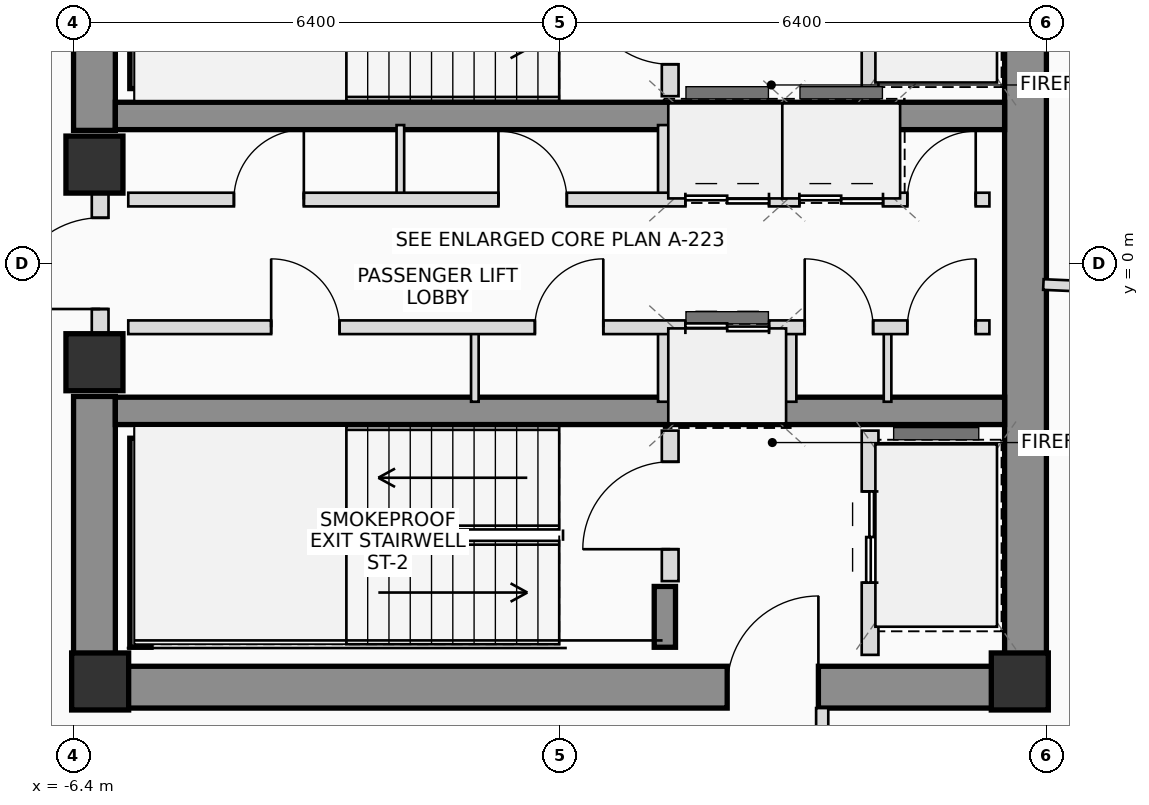
"""IFC4 building model, lengths in metres.
Left out: names, types, materials, properties, quantities, classifications, styles, units other than length and angle.
Written with IfcOpenShell. Run it as: python <this file> out.ifc"""

import sys

from ifc_helpers import new_model, si_unit, direction, frame, frame_2d, origin, origin_2d, place, context, subcontext, project, spatial, rectangle, extrude, source, transform, mapped, element, fill, save


model = new_model("IFC4")
c1 = context("Model", 3, precision=1e-05, world=origin(), true_north=direction((0.0, 1.0)))
c2 = subcontext(c1, "Body", "Model", "MODEL_VIEW")
j1 = project(units=[si_unit("LENGTHUNIT", "METRE"), si_unit("PLANEANGLEUNIT", "RADIAN")], contexts=[c1])
p1 = place(None, origin())
s1 = spatial("IfcSite", under=j1, at=p1, CompositionType="ELEMENT")
p2 = place(p1, origin())
s2 = spatial("IfcBuilding", under=s1, at=p2, CompositionType="ELEMENT")
p3 = place(p2, frame((0.0, 0.0, 249.05)))
s3 = spatial("IfcBuildingStorey", under=s2, at=p3, CompositionType="ELEMENT", Elevation=249.05)
m1 = source(origin(), c2, "Body", "SweptSolid", [
    extrude(rectangle(XDim=0.75, YDim=0.75, at=origin_2d()), origin(), (0.0, 0.0, 1.0), 3.4),
])
for number, where, z_axis, x_axis in (
    (1, (-6.05, -5.5, 0.0), (0.0, 0.0, 1.0), (1.0, 0.0, 0.0)),
    (2, (6.05, -5.5, 0.0), (0.0, 0.0, 1.0), (1.0, 0.0, 0.0)),
):
    element("IfcColumn", number, at=place(p3, frame(where, z_axis=z_axis, x_axis=x_axis)), inside=s3, PredefinedType="COLUMN", context=c2, shape_type="MappedRepresentation", body=[
        mapped(m1, transform((0.0, 0.0, 0.0), scale=1.0)),
    ])
p4 = place(p3, frame((-6.4, -5.575, 0.0), z_axis=(0.0, 0.0, 1.0), x_axis=(1.0, 0.0, 0.0)))
e3 = element("IfcWall", 3, at=p4, inside=s3, PredefinedType="SHEAR", context=c2, shape_type="SweptSolid", body=[
    extrude(rectangle(XDim=12.8, YDim=0.55, at=frame_2d((6.4, 0.0))), origin(), (0.0, 0.0, 1.0), 3.4),
])
p5 = place(p4, frame((8.6, 0.0, 0.0)))
e4 = element("IfcOpeningElement", 4, at=p5, cuts=e3, PredefinedType="OPENING", context=c2, shape_type="SweptSolid", body=[
    extrude(rectangle(XDim=1.2, YDim=2.2, at=frame_2d((0.6, 1.1))), frame((0.0, 0.285, 0.0), z_axis=(0.0, -1.0, 0.0), x_axis=(1.0, 0.0, 0.0)), (0.0, 0.0, 1.0), 0.57),
])
p6 = place(p3, frame((6.125, -5.3, 0.0), z_axis=(0.0, 0.0, 1.0), x_axis=(0.0, 1.0, 0.0)))
e5 = element("IfcWall", 5, at=p6, inside=s3, PredefinedType="SHEAR", context=c2, shape_type="SweptSolid", body=[
    extrude(rectangle(XDim=10.6, YDim=0.55, at=frame_2d((5.3, 0.0))), origin(), (0.0, 0.0, 1.0), 3.4),
])
for number, where, z_axis, x_axis in (
    (6, (-6.125, -5.3, 0.0), (0.0, 0.0, 1.0), (0.0, 1.0, 0.0)),
    (7, (-6.125, 1.75, 0.0), (0.0, 0.0, 1.0), (0.0, 1.0, 0.0)),
):
    element("IfcWall", number, at=place(p3, frame(where, z_axis=z_axis, x_axis=x_axis)), inside=s3, PredefinedType="SHEAR", context=c2, shape_type="SweptSolid", body=[
        extrude(rectangle(XDim=3.55, YDim=0.55, at=frame_2d((1.775, 0.0))), origin(), (0.0, 0.0, 1.0), 3.4),
    ])
for number, where, z_axis, x_axis in (
    (8, (-5.85, 1.94, 0.0), (0.0, 0.0, 1.0), (1.0, 0.0, 0.0)),
    (9, (-5.85, -1.94, 0.0), (0.0, 0.0, 1.0), (1.0, 0.0, 0.0)),
):
    element("IfcWall", number, at=place(p3, frame(where, z_axis=z_axis, x_axis=x_axis)), inside=s3, PredefinedType="SHEAR", context=c2, shape_type="SweptSolid", body=[
        extrude(rectangle(XDim=11.7, YDim=0.36, at=frame_2d((5.85, 0.0))), origin(), (0.0, 0.0, 1.0), 3.4),
    ])
for number, where, z_axis, x_axis in (
    (10, (-5.52, 2.3, 0.0), (0.0, 0.0, 1.0), (0.0, 1.0, 0.0)),
    (11, (-5.52, -5.05, 0.0), (0.0, 0.0, 1.0), (0.0, 1.0, 0.0)),
):
    element("IfcWall", number, at=place(p3, frame(where, z_axis=z_axis, x_axis=x_axis)), inside=s3, PredefinedType="SHEAR", context=c2, shape_type="SweptSolid", body=[
        extrude(rectangle(XDim=2.75, YDim=0.28, at=frame_2d((1.375, 0.0))), origin(), (0.0, 0.0, 1.0), 3.4),
    ])
p7 = place(p3, frame((1.38, -5.05, 0.0), z_axis=(0.0, 0.0, 1.0), x_axis=(0.0, 1.0, 0.0)))
e12 = element("IfcWall", 12, at=p7, inside=s3, PredefinedType="SHEAR", context=c2, shape_type="SweptSolid", body=[
    extrude(rectangle(XDim=0.8, YDim=0.28, at=frame_2d((0.4, 0.0))), origin(), (0.0, 0.0, 1.0), 3.4),
])
for number, where, z_axis, x_axis in (
    (13, (-6.125, -1.3, 0.0), (0.0, 0.0, 1.0), (1.0, 0.0, 0.0)),
    (14, (-6.125, 1.3, 0.0), (0.0, 0.0, 1.0), (1.0, 0.0, 0.0)),
):
    element("IfcColumn", number, at=place(p3, frame(where, z_axis=z_axis, x_axis=x_axis)), inside=s3, PredefinedType="COLUMN", context=c2, shape_type="MappedRepresentation", body=[
        mapped(m1, transform((0.0, 0.0, 0.0), scale=1.0)),
    ])
p8 = place(p3, frame((-6.05, -0.95, 0.0), z_axis=(0.0, 0.0, 1.0), x_axis=(0.0, 1.0, 0.0)))
e15 = element("IfcWall", 15, at=p8, inside=s3, PredefinedType="PLUMBINGWALL", context=c2, shape_type="SweptSolid", body=[
    extrude(rectangle(XDim=1.9, YDim=0.22, at=frame_2d((0.95, 0.0))), origin(), (0.0, 0.0, 1.0), 2.14),
])
p9 = place(p8, frame((0.35, 0.0, 0.0)))
e16 = element("IfcOpeningElement", 16, at=p9, cuts=e15, PredefinedType="OPENING", context=c2, shape_type="SweptSolid", body=[
    extrude(rectangle(XDim=1.2, YDim=2.2, at=frame_2d((0.6, 1.1))), frame((0.0, 0.12, 0.0), z_axis=(0.0, -1.0, 0.0), x_axis=(1.0, 0.0, 0.0)), (0.0, 0.0, 1.0), 0.24),
])
p10 = place(p3, frame((1.45, 2.2, 0.0), z_axis=(0.0, 0.0, 1.0), x_axis=(0.0, 1.0, 0.0)))
e17 = element("IfcWall", 17, at=p10, inside=s3, PredefinedType="PLUMBINGWALL", context=c2, shape_type="SweptSolid", body=[
    extrude(rectangle(XDim=1.98, YDim=0.22, at=frame_2d((0.99, 0.0))), origin(), (0.0, 0.0, 1.0), 3.16),
])
p11 = place(p10, frame((0.42, 0.0, 0.0)))
e18 = element("IfcOpeningElement", 18, at=p11, cuts=e17, PredefinedType="OPENING", context=c2, shape_type="SweptSolid", body=[
    extrude(rectangle(XDim=1.15, YDim=2.15, at=frame_2d((0.575, 1.075))), frame((0.0, 0.12, 0.0), z_axis=(0.0, -1.0, 0.0), x_axis=(1.0, 0.0, 0.0)), (0.0, 0.0, 1.0), 0.24),
])
p12 = place(p3, frame((4.08, 2.2, 0.0), z_axis=(0.0, 0.0, 1.0), x_axis=(0.0, 1.0, 0.0)))
e19 = element("IfcWall", 19, at=p12, inside=s3, PredefinedType="PLUMBINGWALL", context=c2, shape_type="SweptSolid", body=[
    extrude(rectangle(XDim=2.95, YDim=0.22, at=frame_2d((1.475, 0.0))), origin(), (0.0, 0.0, 1.0), 3.16),
])
p13 = place(p12, frame((0.75, 0.0, 0.0)))
e20 = element("IfcOpeningElement", 20, at=p13, cuts=e19, PredefinedType="OPENING", context=c2, shape_type="SweptSolid", body=[
    extrude(rectangle(XDim=1.2, YDim=2.25, at=frame_2d((0.6, 1.125))), frame((0.0, 0.12, 0.0), z_axis=(0.0, -1.0, 0.0), x_axis=(1.0, 0.0, 0.0)), (0.0, 0.0, 1.0), 0.24),
])
p14 = place(p3, frame((1.45, -4.18, 0.0), z_axis=(0.0, 0.0, 1.0), x_axis=(0.0, 1.0, 0.0)))
e21 = element("IfcWall", 21, at=p14, inside=s3, PredefinedType="PLUMBINGWALL", context=c2, shape_type="SweptSolid", body=[
    extrude(rectangle(XDim=1.98, YDim=0.22, at=frame_2d((0.99, 0.0))), origin(), (0.0, 0.0, 1.0), 3.16),
])
p15 = place(p14, frame((0.42, 0.0, 0.0)))
e22 = element("IfcOpeningElement", 22, at=p15, cuts=e21, PredefinedType="OPENING", context=c2, shape_type="SweptSolid", body=[
    extrude(rectangle(XDim=1.15, YDim=2.15, at=frame_2d((0.575, 1.075))), frame((0.0, 0.12, 0.0), z_axis=(0.0, -1.0, 0.0), x_axis=(1.0, 0.0, 0.0)), (0.0, 0.0, 1.0), 0.24),
])
p16 = place(p3, frame((4.08, -5.15, 0.0), z_axis=(0.0, 0.0, 1.0), x_axis=(0.0, 1.0, 0.0)))
e23 = element("IfcWall", 23, at=p16, inside=s3, PredefinedType="PLUMBINGWALL", context=c2, shape_type="SweptSolid", body=[
    extrude(rectangle(XDim=2.95, YDim=0.22, at=frame_2d((1.475, 0.0))), origin(), (0.0, 0.0, 1.0), 3.16),
])
p17 = place(p16, frame((0.95, 0.0, 0.0)))
e24 = element("IfcOpeningElement", 24, at=p17, cuts=e23, PredefinedType="OPENING", context=c2, shape_type="SweptSolid", body=[
    extrude(rectangle(XDim=1.2, YDim=2.25, at=frame_2d((0.6, 1.125))), frame((0.0, 0.12, 0.0), z_axis=(0.0, -1.0, 0.0), x_axis=(1.0, 0.0, 0.0)), (0.0, 0.0, 1.0), 0.24),
])
for number, where, z_axis, x_axis in (
    (25, (-2.1, 0.84, 0.0), (0.0, 0.0, 1.0), (0.0, 1.0, 0.0)),
    (26, (-1.12, -1.82, 0.0), (0.0, 0.0, 1.0), (0.0, 1.0, 0.0)),
):
    element("IfcWall", number, at=place(p3, frame(where, z_axis=z_axis, x_axis=x_axis)), inside=s3, PredefinedType="PARTITIONING", context=c2, shape_type="SweptSolid", body=[
        extrude(rectangle(XDim=0.98, YDim=0.1, at=frame_2d((0.49, 0.0))), origin(), (0.0, 0.0, 1.0), 3.16),
    ])
for number, where, z_axis, x_axis in (
    (27, (1.38, 0.84, 0.0), (0.0, 0.0, 1.0), (0.0, 1.0, 0.0)),
    (28, (1.38, -1.82, 0.0), (0.0, 0.0, 1.0), (0.0, 1.0, 0.0)),
    (29, (3.02, 0.84, 0.0), (0.0, 0.0, 1.0), (0.0, 1.0, 0.0)),
    (30, (4.38, 0.84, 0.0), (0.0, 0.0, 1.0), (0.0, 1.0, 0.0)),
    (31, (3.02, -1.82, 0.0), (0.0, 0.0, 1.0), (0.0, 1.0, 0.0)),
):
    element("IfcWall", number, at=place(p3, frame(where, z_axis=z_axis, x_axis=x_axis)), inside=s3, PredefinedType="PLUMBINGWALL", context=c2, shape_type="SweptSolid", body=[
        extrude(rectangle(XDim=0.98, YDim=0.18, at=frame_2d((0.49, 0.0))), origin(), (0.0, 0.0, 1.0), 3.16),
    ])
p18 = place(p3, frame((4.31, -1.82, 0.0), z_axis=(0.0, 0.0, 1.0), x_axis=(0.0, 1.0, 0.0)))
e32 = element("IfcWall", 32, at=p18, inside=s3, PredefinedType="PARTITIONING", context=c2, shape_type="SweptSolid", body=[
    extrude(rectangle(XDim=0.98, YDim=0.1, at=frame_2d((0.49, 0.0))), origin(), (0.0, 0.0, 1.0), 3.16),
])
p19 = place(p3, frame((-5.68, 0.84, 0.0), z_axis=(0.0, 0.0, 1.0), x_axis=(1.0, 0.0, 0.0)))
e33 = element("IfcWall", 33, at=p19, inside=s3, PredefinedType="PLUMBINGWALL", context=c2, shape_type="SweptSolid", body=[
    extrude(rectangle(XDim=11.33, YDim=0.18, at=frame_2d((5.665, 0.0))), origin(), (0.0, 0.0, 1.0), 3.16),
])
p20 = place(p19, frame((1.39, 0.0, 0.0)))
e34 = element("IfcOpeningElement", 34, at=p20, cuts=e33, PredefinedType="OPENING", context=c2, shape_type="SweptSolid", body=[
    extrude(rectangle(XDim=0.92, YDim=2.1, at=frame_2d((0.46, 1.05))), frame((0.0, 0.1, 0.0), z_axis=(0.0, -1.0, 0.0), x_axis=(1.0, 0.0, 0.0)), (0.0, 0.0, 1.0), 0.2),
])
p21 = place(p19, frame((4.87, 0.0, 0.0)))
e35 = element("IfcOpeningElement", 35, at=p21, cuts=e33, PredefinedType="OPENING", context=c2, shape_type="SweptSolid", body=[
    extrude(rectangle(XDim=0.9, YDim=2.05, at=frame_2d((0.45, 1.025))), frame((0.0, 0.1, 0.0), z_axis=(0.0, -1.0, 0.0), x_axis=(1.0, 0.0, 0.0)), (0.0, 0.0, 1.0), 0.2),
])
p22 = place(p19, frame((7.33, 0.0, 0.0)))
e36 = element("IfcOpeningElement", 36, at=p22, cuts=e33, PredefinedType="OPENING", context=c2, shape_type="SweptSolid", body=[
    extrude(rectangle(XDim=1.1, YDim=2.2, at=frame_2d((0.55, 1.1))), frame((0.0, 0.1, 0.0), z_axis=(0.0, -1.0, 0.0), x_axis=(1.0, 0.0, 0.0)), (0.0, 0.0, 1.0), 0.2),
])
p23 = place(p19, frame((8.83, 0.0, 0.0)))
e37 = element("IfcOpeningElement", 37, at=p23, cuts=e33, PredefinedType="OPENING", context=c2, shape_type="SweptSolid", body=[
    extrude(rectangle(XDim=1.1, YDim=2.2, at=frame_2d((0.55, 1.1))), frame((0.0, 0.1, 0.0), z_axis=(0.0, -1.0, 0.0), x_axis=(1.0, 0.0, 0.0)), (0.0, 0.0, 1.0), 0.2),
])
p24 = place(p19, frame((10.25, 0.0, 0.0)))
e38 = element("IfcOpeningElement", 38, at=p24, cuts=e33, PredefinedType="OPENING", context=c2, shape_type="SweptSolid", body=[
    extrude(rectangle(XDim=0.9, YDim=2.05, at=frame_2d((0.45, 1.025))), frame((0.0, 0.1, 0.0), z_axis=(0.0, -1.0, 0.0), x_axis=(1.0, 0.0, 0.0)), (0.0, 0.0, 1.0), 0.2),
])
p25 = place(p3, frame((-5.68, -0.84, 0.0), z_axis=(0.0, 0.0, 1.0), x_axis=(1.0, 0.0, 0.0)))
e39 = element("IfcWall", 39, at=p25, inside=s3, PredefinedType="PLUMBINGWALL", context=c2, shape_type="SweptSolid", body=[
    extrude(rectangle(XDim=11.33, YDim=0.18, at=frame_2d((5.665, 0.0))), origin(), (0.0, 0.0, 1.0), 3.16),
])
p26 = place(p25, frame((1.88, 0.0, 0.0)))
e40 = element("IfcOpeningElement", 40, at=p26, cuts=e39, PredefinedType="OPENING", context=c2, shape_type="SweptSolid", body=[
    extrude(rectangle(XDim=0.9, YDim=2.05, at=frame_2d((0.45, 1.025))), frame((0.0, 0.1, 0.0), z_axis=(0.0, -1.0, 0.0), x_axis=(1.0, 0.0, 0.0)), (0.0, 0.0, 1.0), 0.2),
])
p27 = place(p25, frame((5.35, 0.0, 0.0)))
e41 = element("IfcOpeningElement", 41, at=p27, cuts=e39, PredefinedType="OPENING", context=c2, shape_type="SweptSolid", body=[
    extrude(rectangle(XDim=0.9, YDim=2.05, at=frame_2d((0.45, 1.025))), frame((0.0, 0.1, 0.0), z_axis=(0.0, -1.0, 0.0), x_axis=(1.0, 0.0, 0.0)), (0.0, 0.0, 1.0), 0.2),
])
p28 = place(p25, frame((7.33, 0.0, 0.0)))
e42 = element("IfcOpeningElement", 42, at=p28, cuts=e39, PredefinedType="OPENING", context=c2, shape_type="SweptSolid", body=[
    extrude(rectangle(XDim=1.1, YDim=2.2, at=frame_2d((0.55, 1.1))), frame((0.0, 0.1, 0.0), z_axis=(0.0, -1.0, 0.0), x_axis=(1.0, 0.0, 0.0)), (0.0, 0.0, 1.0), 0.2),
])
p29 = place(p25, frame((8.9, 0.0, 0.0)))
e43 = element("IfcOpeningElement", 43, at=p29, cuts=e39, PredefinedType="OPENING", context=c2, shape_type="SweptSolid", body=[
    extrude(rectangle(XDim=0.9, YDim=2.05, at=frame_2d((0.45, 1.025))), frame((0.0, 0.1, 0.0), z_axis=(0.0, -1.0, 0.0), x_axis=(1.0, 0.0, 0.0)), (0.0, 0.0, 1.0), 0.2),
])
p30 = place(p25, frame((10.25, 0.0, 0.0)))
e44 = element("IfcOpeningElement", 44, at=p30, cuts=e39, PredefinedType="OPENING", context=c2, shape_type="SweptSolid", body=[
    extrude(rectangle(XDim=0.9, YDim=2.05, at=frame_2d((0.45, 1.025))), frame((0.0, 0.1, 0.0), z_axis=(0.0, -1.0, 0.0), x_axis=(1.0, 0.0, 0.0)), (0.0, 0.0, 1.0), 0.2),
])
p31 = place(p3, frame((3.45, -5.85, 0.0), z_axis=(0.0, 0.0, 1.0), x_axis=(0.0, -1.0, 0.0)))
e45 = element("IfcWall", 45, at=p31, inside=s3, PredefinedType="PARTITIONING", context=c2, shape_type="SweptSolid", body=[
    extrude(rectangle(XDim=1.64, YDim=0.16, at=frame_2d((0.82, 0.0))), origin(), (0.0, 0.0, 1.0), 3.16),
])
p32 = place(p31, frame((0.32, 0.0, 0.0)))
e46 = element("IfcOpeningElement", 46, at=p32, cuts=e45, PredefinedType="OPENING", context=c2, shape_type="SweptSolid", body=[
    extrude(rectangle(XDim=1.0, YDim=2.25, at=frame_2d((0.5, 1.125))), frame((0.0, 0.09, 0.0), z_axis=(0.0, -1.0, 0.0), x_axis=(1.0, 0.0, 0.0)), (0.0, 0.0, 1.0), 0.18),
])
p33 = place(p3, frame((6.36, -0.278, 0.0), z_axis=(0.0, 0.0, 1.0), x_axis=(0.99904773846, -0.043630451279, 0.0)))
e47 = element("IfcWall", 47, at=p33, inside=s3, PredefinedType="PARTITIONING", context=c2, shape_type="SweptSolid", body=[
    extrude(rectangle(XDim=8.992, YDim=0.14, at=frame_2d((4.496, 0.0))), origin(), (0.0, 0.0, 1.0), 2.725),
])
p34 = place(p5, origin())
e48 = element("IfcDoor", 48, at=p34, inside=s3, OperationType="SINGLE_SWING_RIGHT", PredefinedType="DOOR", context=c2, shape_type="SweptSolid", body=[
    extrude(rectangle(XDim=1.2, YDim=2.2, at=frame_2d((0.6, 1.1))), frame((0.0, 0.025, 0.0), z_axis=(0.0, -1.0, 0.0), x_axis=(1.0, 0.0, 0.0)), (0.0, 0.0, 1.0), 0.05),
])
fill(e4, e48)
p35 = place(p9, origin())
e49 = element("IfcDoor", 49, at=p35, inside=s3, OperationType="SINGLE_SWING_LEFT", PredefinedType="DOOR", context=c2, shape_type="SweptSolid", body=[
    extrude(rectangle(XDim=1.2, YDim=2.2, at=frame_2d((0.6, 1.1))), frame((0.0, 0.025, 0.0), z_axis=(0.0, -1.0, 0.0), x_axis=(1.0, 0.0, 0.0)), (0.0, 0.0, 1.0), 0.05),
])
fill(e16, e49)
p36 = place(p11, origin())
e50 = element("IfcDoor", 50, at=p36, inside=s3, OperationType="SINGLE_SWING_RIGHT", PredefinedType="DOOR", context=c2, shape_type="SweptSolid", body=[
    extrude(rectangle(XDim=1.15, YDim=2.15, at=frame_2d((0.575, 1.075))), frame((0.0, 0.025, 0.0), z_axis=(0.0, -1.0, 0.0), x_axis=(1.0, 0.0, 0.0)), (0.0, 0.0, 1.0), 0.05),
])
fill(e18, e50)
p37 = place(p15, origin())
e51 = element("IfcDoor", 51, at=p37, inside=s3, OperationType="SINGLE_SWING_LEFT", PredefinedType="DOOR", context=c2, shape_type="SweptSolid", body=[
    extrude(rectangle(XDim=1.15, YDim=2.15, at=frame_2d((0.575, 1.075))), frame((0.0, 0.025, 0.0), z_axis=(0.0, -1.0, 0.0), x_axis=(1.0, 0.0, 0.0)), (0.0, 0.0, 1.0), 0.05),
])
fill(e22, e51)
p38 = place(p17, origin())
e52 = element("IfcDoor", 52, at=p38, inside=s3, OperationType="DOUBLE_DOOR_SLIDING", PredefinedType="DOOR", context=c2, shape_type="SweptSolid", body=[
    extrude(rectangle(XDim=1.2, YDim=2.25, at=frame_2d((0.6, 1.125))), frame((0.0, 0.025, 0.0), z_axis=(0.0, -1.0, 0.0), x_axis=(1.0, 0.0, 0.0)), (0.0, 0.0, 1.0), 0.05),
])
fill(e24, e52)
p39 = place(p20, origin())
e53 = element("IfcDoor", 53, at=p39, inside=s3, OperationType="SINGLE_SWING_RIGHT", PredefinedType="DOOR", context=c2, shape_type="SweptSolid", body=[
    extrude(rectangle(XDim=0.92, YDim=2.1, at=frame_2d((0.46, 1.05))), frame((0.0, 0.025, 0.0), z_axis=(0.0, -1.0, 0.0), x_axis=(1.0, 0.0, 0.0)), (0.0, 0.0, 1.0), 0.05),
])
fill(e34, e53)
p40 = place(p21, origin())
e54 = element("IfcDoor", 54, at=p40, inside=s3, OperationType="SINGLE_SWING_LEFT", PredefinedType="DOOR", context=c2, shape_type="SweptSolid", body=[
    extrude(rectangle(XDim=0.9, YDim=2.05, at=frame_2d((0.45, 1.025))), frame((0.0, 0.025, 0.0), z_axis=(0.0, -1.0, 0.0), x_axis=(1.0, 0.0, 0.0)), (0.0, 0.0, 1.0), 0.05),
])
fill(e35, e54)
p41 = place(p22, origin())
e55 = element("IfcDoor", 55, at=p41, inside=s3, OperationType="DOUBLE_DOOR_SLIDING", PredefinedType="DOOR", context=c2, shape_type="SweptSolid", body=[
    extrude(rectangle(XDim=1.1, YDim=2.2, at=frame_2d((0.55, 1.1))), frame((0.0, 0.025, 0.0), z_axis=(0.0, -1.0, 0.0), x_axis=(1.0, 0.0, 0.0)), (0.0, 0.0, 1.0), 0.05),
])
fill(e36, e55)
p42 = place(p23, origin())
e56 = element("IfcDoor", 56, at=p42, inside=s3, OperationType="DOUBLE_DOOR_SLIDING", PredefinedType="DOOR", context=c2, shape_type="SweptSolid", body=[
    extrude(rectangle(XDim=1.1, YDim=2.2, at=frame_2d((0.55, 1.1))), frame((0.0, 0.025, 0.0), z_axis=(0.0, -1.0, 0.0), x_axis=(1.0, 0.0, 0.0)), (0.0, 0.0, 1.0), 0.05),
])
fill(e37, e56)
p43 = place(p24, origin())
e57 = element("IfcDoor", 57, at=p43, inside=s3, OperationType="SINGLE_SWING_RIGHT", PredefinedType="DOOR", context=c2, shape_type="SweptSolid", body=[
    extrude(rectangle(XDim=0.9, YDim=2.05, at=frame_2d((0.45, 1.025))), frame((0.0, 0.025, 0.0), z_axis=(0.0, -1.0, 0.0), x_axis=(1.0, 0.0, 0.0)), (0.0, 0.0, 1.0), 0.05),
])
fill(e38, e57)
p44 = place(p26, origin())
e58 = element("IfcDoor", 58, at=p44, inside=s3, OperationType="SINGLE_SWING_LEFT", PredefinedType="DOOR", context=c2, shape_type="SweptSolid", body=[
    extrude(rectangle(XDim=0.9, YDim=2.05, at=frame_2d((0.45, 1.025))), frame((0.0, 0.025, 0.0), z_axis=(0.0, -1.0, 0.0), x_axis=(1.0, 0.0, 0.0)), (0.0, 0.0, 1.0), 0.05),
])
fill(e40, e58)
p45 = place(p27, origin())
e59 = element("IfcDoor", 59, at=p45, inside=s3, OperationType="SINGLE_SWING_RIGHT", PredefinedType="DOOR", context=c2, shape_type="SweptSolid", body=[
    extrude(rectangle(XDim=0.9, YDim=2.05, at=frame_2d((0.45, 1.025))), frame((0.0, 0.025, 0.0), z_axis=(0.0, -1.0, 0.0), x_axis=(1.0, 0.0, 0.0)), (0.0, 0.0, 1.0), 0.05),
])
fill(e41, e59)
p46 = place(p28, origin())
e60 = element("IfcDoor", 60, at=p46, inside=s3, OperationType="DOUBLE_DOOR_SLIDING", PredefinedType="DOOR", context=c2, shape_type="SweptSolid", body=[
    extrude(rectangle(XDim=1.1, YDim=2.2, at=frame_2d((0.55, 1.1))), frame((0.0, 0.025, 0.0), z_axis=(0.0, -1.0, 0.0), x_axis=(1.0, 0.0, 0.0)), (0.0, 0.0, 1.0), 0.05),
])
fill(e42, e60)
p47 = place(p29, origin())
e61 = element("IfcDoor", 61, at=p47, inside=s3, OperationType="SINGLE_SWING_LEFT", PredefinedType="DOOR", context=c2, shape_type="SweptSolid", body=[
    extrude(rectangle(XDim=0.9, YDim=2.05, at=frame_2d((0.45, 1.025))), frame((0.0, 0.025, 0.0), z_axis=(0.0, -1.0, 0.0), x_axis=(1.0, 0.0, 0.0)), (0.0, 0.0, 1.0), 0.05),
])
fill(e43, e61)
p48 = place(p30, origin())
e62 = element("IfcDoor", 62, at=p48, inside=s3, OperationType="SINGLE_SWING_RIGHT", PredefinedType="DOOR", context=c2, shape_type="SweptSolid", body=[
    extrude(rectangle(XDim=0.9, YDim=2.05, at=frame_2d((0.45, 1.025))), frame((0.0, 0.025, 0.0), z_axis=(0.0, -1.0, 0.0), x_axis=(1.0, 0.0, 0.0)), (0.0, 0.0, 1.0), 0.05),
])
fill(e44, e62)
save(model, sys.argv[1])
